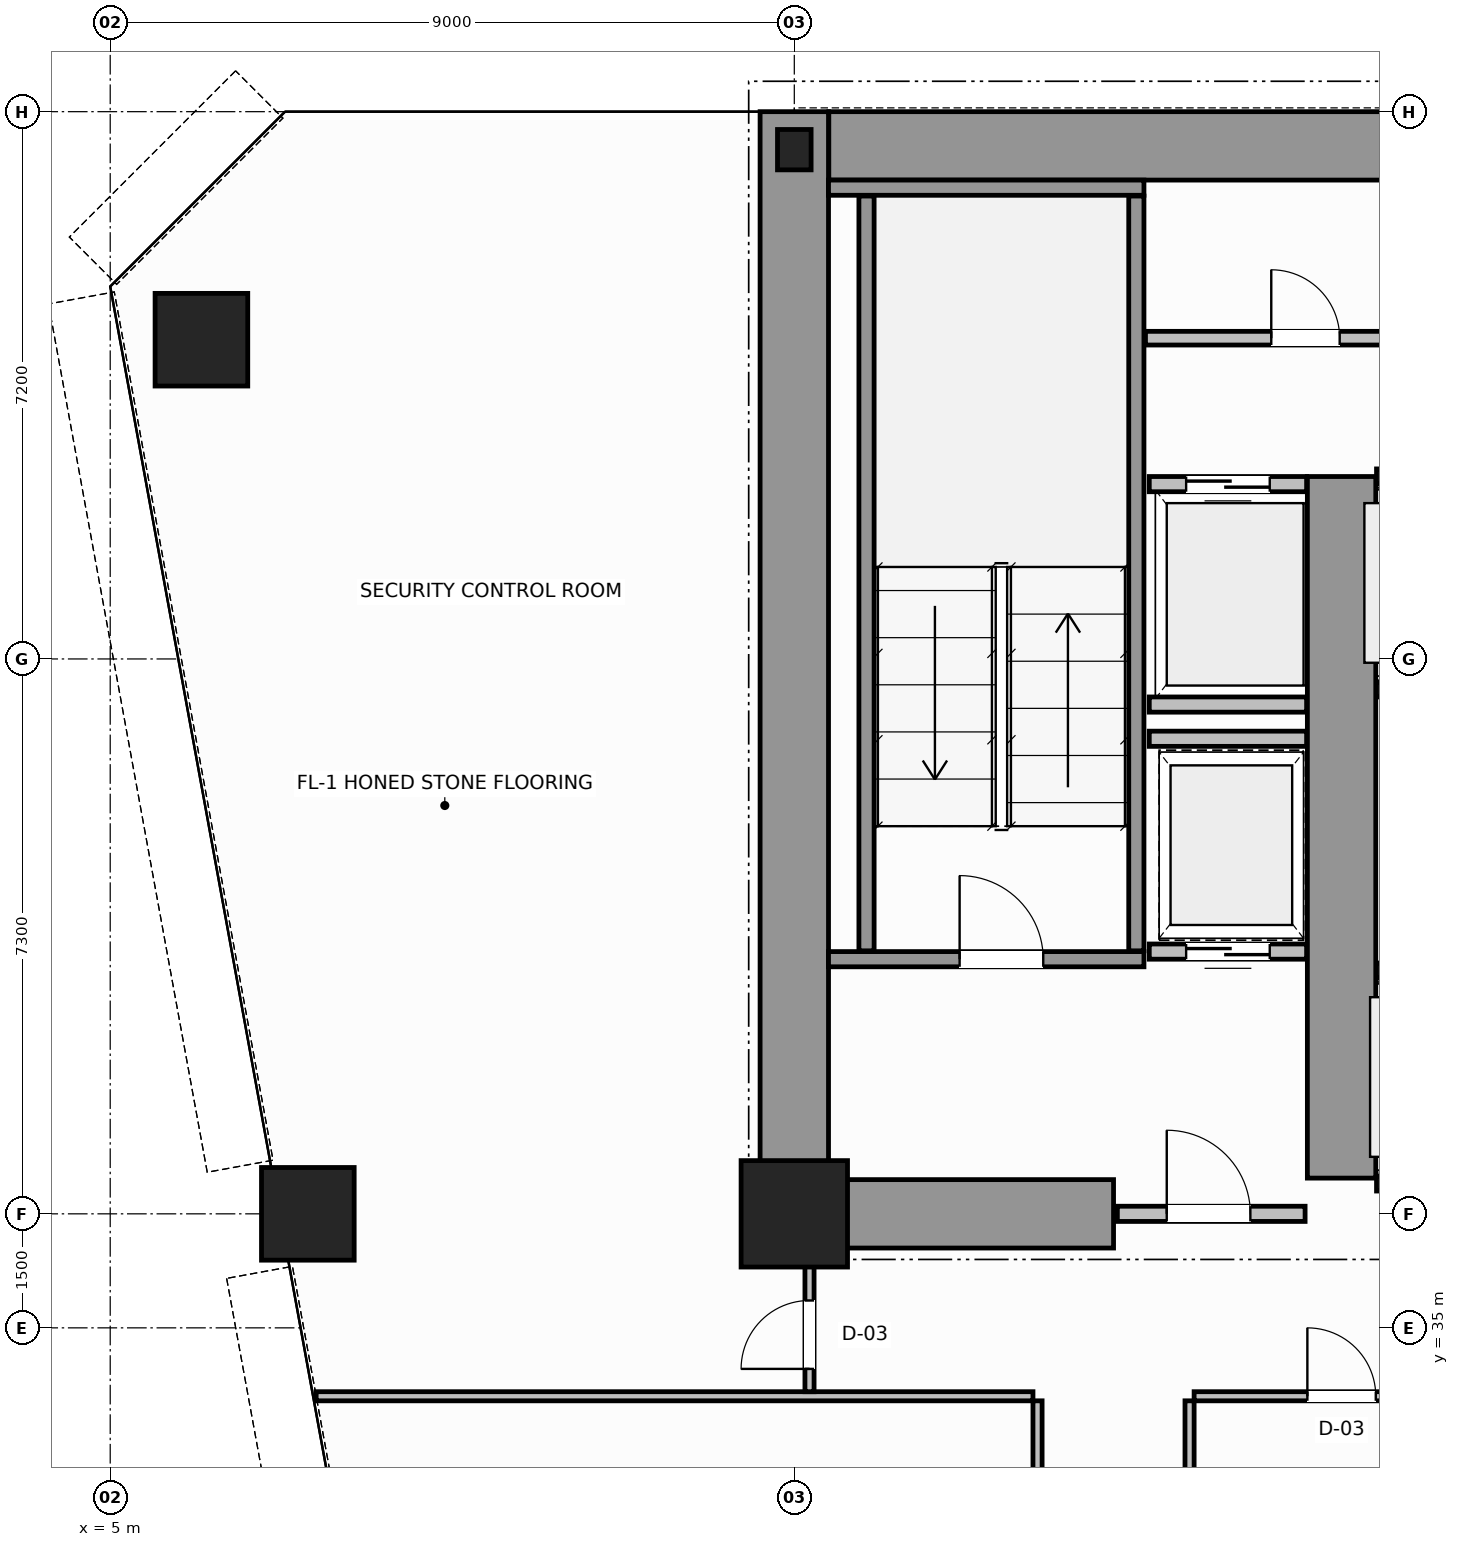
"""IFC4 building model, lengths in metres.
Left out: names, types, materials, properties, quantities, classifications, styles, units other than length and angle.
Written with IfcOpenShell. Run it as: python <this file> out.ifc"""

import sys

from ifc_helpers import new_model, si_unit, direction, frame, frame_2d, origin, origin_2d, place, context, subcontext, project, spatial, rectangle, hollow_circle, i_section, extrude, source, transform, mapped, element, fill, save


model = new_model("IFC4")
c1 = context("Model", 3, precision=1e-05, world=origin(), true_north=direction((0.0, 1.0)))
c2 = subcontext(c1, "Body", "Model", "MODEL_VIEW")
j1 = project(units=[si_unit("LENGTHUNIT", "METRE"), si_unit("PLANEANGLEUNIT", "RADIAN")], contexts=[c1])
p1 = place(None, origin())
s1 = spatial("IfcSite", under=j1, at=p1, CompositionType="ELEMENT")
p2 = place(p1, origin())
s2 = spatial("IfcBuilding", under=s1, at=p2, CompositionType="ELEMENT")
p3 = place(p2, frame((0.0, 0.0, 79.6)))
s3 = spatial("IfcBuildingStorey", under=s2, at=p3, CompositionType="ELEMENT", Elevation=79.6)
m1 = source(origin(), c2, "Body", "SweptSolid", [
    extrude(rectangle(XDim=1.4, YDim=1.4, at=origin_2d()), origin(), (0.0, 0.0, 1.0), 3.8),
])
p4 = place(p3, frame((14.0, 36.5, 0.0), z_axis=(0.0, 0.0, 1.0), x_axis=(1.0, 0.0, 0.0)))
e1 = element("IfcColumn", 1, at=p4, inside=s3, PredefinedType="COLUMN", context=c2, shape_type="MappedRepresentation", body=[
    mapped(m1, transform((0.0, 0.0, 0.0), scale=1.0)),
])
m2 = source(origin(), c2, "Body", "SweptSolid", [
    extrude(i_section(OverallWidth=0.442, OverallDepth=0.531, WebThickness=0.065, FlangeThickness=0.076, FilletRadius=0.015, at=origin_2d()), origin(), (0.0, 0.0, 1.0), 3.8),
])
p5 = place(p3, frame((14.0, 50.5, 0.0), z_axis=(0.0, 0.0, 1.0), x_axis=(1.0, 0.0, 0.0)))
e2 = element("IfcColumn", 2, at=p5, inside=s3, PredefinedType="COLUMN", context=c2, shape_type="MappedRepresentation", body=[
    mapped(m2, transform((0.0, 0.0, 0.0), scale=1.0)),
])
m3 = source(origin(), c2, "Body", "SweptSolid", [
    extrude(hollow_circle(Radius=0.61, WallThickness=0.05, at=origin_2d()), origin(), (0.0, 0.0, 1.0), 3.8),
])
for number, where, z_axis, x_axis in (
    (3, (6.2, 48.0, 0.0), (0.0, 0.0, 1.0), (1.0, 0.0, 0.0)),
    (4, (7.6, 36.5, 0.0), (0.0, 0.0, 1.0), (1.0, 0.0, 0.0)),
):
    element("IfcColumn", number, at=place(p3, frame(where, z_axis=z_axis, x_axis=x_axis)), inside=s3, PredefinedType="COLUMN", context=c2, shape_type="MappedRepresentation", body=[
        mapped(m3, transform((0.0, 0.0, 0.0), scale=1.0)),
    ])
p6 = place(p3, frame((14.454, 50.55, 0.0), z_axis=(0.0, 0.0, 1.0), x_axis=(1.0, 0.0, 0.0)))
e5 = element("IfcWall", 5, at=p6, inside=s3, PredefinedType="SHEAR", context=c2, shape_type="SweptSolid", body=[
    extrude(rectangle(XDim=19.544, YDim=0.9, at=frame_2d((9.772, 0.0))), origin(), (0.0, 0.0, 1.0), 3.8),
])
p7 = place(p3, frame((14.0, 36.5, 0.0), z_axis=(0.0, 0.0, 1.0), x_axis=(0.0, 1.0, 0.0)))
e6 = element("IfcWall", 6, at=p7, inside=s3, PredefinedType="SHEAR", context=c2, shape_type="SweptSolid", body=[
    extrude(rectangle(XDim=14.5, YDim=0.9, at=frame_2d((7.25, 0.0))), origin(), (0.0, 0.0, 1.0), 3.8),
])
p8 = place(p3, frame((14.47, 36.5, 0.0), z_axis=(0.0, 0.0, 1.0), x_axis=(1.0, 0.0, 0.0)))
e7 = element("IfcWall", 7, at=p8, inside=s3, PredefinedType="SHEAR", context=c2, shape_type="SweptSolid", body=[
    extrude(rectangle(XDim=3.73, YDim=0.9, at=frame_2d((1.865, 0.0))), origin(), (0.0, 0.0, 1.0), 2.34),
])
p9 = place(p3, frame((21.2, 36.97, 0.0), z_axis=(0.0, 0.0, 1.0), x_axis=(0.0, 1.0, 0.0)))
e8 = element("IfcWall", 8, at=p9, inside=s3, PredefinedType="SHEAR", context=c2, shape_type="SweptSolid", body=[
    extrude(rectangle(XDim=9.23, YDim=0.9, at=frame_2d((4.615, 0.0))), origin(), (0.0, 0.0, 1.0), 3.8),
])
p10 = place(p3, frame((14.45, 39.85, 0.0), z_axis=(0.0, 0.0, 1.0), x_axis=(1.0, 0.0, 0.0)))
e9 = element("IfcWall", 9, at=p10, inside=s3, PredefinedType="SOLIDWALL", context=c2, shape_type="SweptSolid", body=[
    extrude(rectangle(XDim=4.15, YDim=0.2, at=frame_2d((2.075, 0.0))), origin(), (0.0, 0.0, 1.0), 3.8),
])
p11 = place(p10, frame((1.725, 0.0, 0.0)))
e10 = element("IfcOpeningElement", 10, at=p11, cuts=e9, PredefinedType="OPENING", context=c2, shape_type="SweptSolid", body=[
    extrude(rectangle(XDim=1.1, YDim=2.15, at=frame_2d((0.55, 1.075))), frame((0.0, 0.11, 0.0), z_axis=(0.0, -1.0, 0.0), x_axis=(1.0, 0.0, 0.0)), (0.0, 0.0, 1.0), 0.22),
])
p12 = place(p3, frame((14.45, 50.0, 0.0), z_axis=(0.0, 0.0, 1.0), x_axis=(1.0, 0.0, 0.0)))
e11 = element("IfcWall", 11, at=p12, inside=s3, PredefinedType="SOLIDWALL", context=c2, shape_type="SweptSolid", body=[
    extrude(rectangle(XDim=4.15, YDim=0.2, at=frame_2d((2.075, 0.0))), origin(), (0.0, 0.0, 1.0), 3.8),
])
for number, where, z_axis, x_axis in (
    (12, (14.95, 39.96, 0.0), (0.0, 0.0, 1.0), (0.0, 1.0, 0.0)),
    (13, (18.5, 39.96, 0.0), (0.0, 0.0, 1.0), (0.0, 1.0, 0.0)),
):
    element("IfcWall", number, at=place(p3, frame(where, z_axis=z_axis, x_axis=x_axis)), inside=s3, PredefinedType="SOLIDWALL", context=c2, shape_type="SweptSolid", body=[
        extrude(rectangle(XDim=9.93, YDim=0.2, at=frame_2d((4.965, 0.0))), origin(), (0.0, 0.0, 1.0), 3.8),
    ])
p13 = place(p3, frame((18.25, 36.5, 0.0), z_axis=(0.0, 0.0, 1.0), x_axis=(1.0, 0.0, 0.0)))
e14 = element("IfcWall", 14, at=p13, inside=s3, PredefinedType="SOLIDWALL", context=c2, shape_type="SweptSolid", body=[
    extrude(rectangle(XDim=2.47, YDim=0.2, at=frame_2d((1.235, 0.0))), origin(), (0.0, 0.0, 1.0), 2.33),
])
p14 = place(p13, frame((0.65, 0.0, 0.0)))
e15 = element("IfcOpeningElement", 15, at=p14, cuts=e14, PredefinedType="OPENING", context=c2, shape_type="SweptSolid", body=[
    extrude(rectangle(XDim=1.1, YDim=2.15, at=frame_2d((0.55, 1.075))), frame((0.0, 0.11, 0.0), z_axis=(0.0, -1.0, 0.0), x_axis=(1.0, 0.0, 0.0)), (0.0, 0.0, 1.0), 0.22),
])
p15 = place(p3, frame((21.66, 39.7, 0.0), z_axis=(0.0, 0.0, 1.0), x_axis=(1.0, 0.0, 0.0)))
e16 = element("IfcWall", 16, at=p15, inside=s3, PredefinedType="SOLIDWALL", context=c2, shape_type="SweptSolid", body=[
    extrude(rectangle(XDim=1.77, YDim=0.2, at=frame_2d((0.885, 0.0))), origin(), (0.0, 0.0, 1.0), 3.54),
])
p16 = place(p15, frame((0.335, 0.0, 0.0)))
e17 = element("IfcOpeningElement", 17, at=p16, cuts=e16, PredefinedType="OPENING", context=c2, shape_type="SweptSolid", body=[
    extrude(rectangle(XDim=1.1, YDim=2.15, at=frame_2d((0.55, 1.075))), frame((0.0, 0.11, 0.0), z_axis=(0.0, -1.0, 0.0), x_axis=(1.0, 0.0, 0.0)), (0.0, 0.0, 1.0), 0.22),
])
p17 = place(p3, frame((21.66, 36.9, 0.0), z_axis=(0.0, 0.0, 1.0), x_axis=(1.0, 0.0, 0.0)))
e18 = element("IfcWall", 18, at=p17, inside=s3, PredefinedType="SOLIDWALL", context=c2, shape_type="SweptSolid", body=[
    extrude(rectangle(XDim=1.77, YDim=0.2, at=frame_2d((0.885, 0.0))), origin(), (0.0, 0.0, 1.0), 2.33),
])
p18 = place(p3, frame((21.66, 43.4, 0.0), z_axis=(0.0, 0.0, 1.0), x_axis=(1.0, 0.0, 0.0)))
e19 = element("IfcWall", 19, at=p18, inside=s3, PredefinedType="SOLIDWALL", context=c2, shape_type="SweptSolid", body=[
    extrude(rectangle(XDim=1.65, YDim=0.2, at=frame_2d((0.825, 0.0))), origin(), (0.0, 0.0, 1.0), 3.54),
])
p19 = place(p18, frame((0.275, 0.0, 0.0)))
e20 = element("IfcOpeningElement", 20, at=p19, cuts=e19, PredefinedType="OPENING", context=c2, shape_type="SweptSolid", body=[
    extrude(rectangle(XDim=1.1, YDim=2.15, at=frame_2d((0.55, 1.075))), frame((0.0, 0.11, 0.0), z_axis=(0.0, -1.0, 0.0), x_axis=(1.0, 0.0, 0.0)), (0.0, 0.0, 1.0), 0.22),
])
p20 = place(p3, frame((21.66, 46.2, 0.0), z_axis=(0.0, 0.0, 1.0), x_axis=(1.0, 0.0, 0.0)))
e21 = element("IfcWall", 21, at=p20, inside=s3, PredefinedType="SOLIDWALL", context=c2, shape_type="SweptSolid", body=[
    extrude(rectangle(XDim=1.65, YDim=0.2, at=frame_2d((0.825, 0.0))), origin(), (0.0, 0.0, 1.0), 3.54),
])
p21 = place(p3, frame((18.67, 46.1, 0.0), z_axis=(0.0, 0.0, 1.0), x_axis=(1.0, 0.0, 0.0)))
e22 = element("IfcWall", 22, at=p21, inside=s3, PredefinedType="SOLIDWALL", context=c2, shape_type="SweptSolid", body=[
    extrude(rectangle(XDim=2.07, YDim=0.2, at=frame_2d((1.035, 0.0))), origin(), (0.0, 0.0, 1.0), 3.54),
])
p22 = place(p21, frame((0.485, 0.0, 0.0)))
e23 = element("IfcOpeningElement", 23, at=p22, cuts=e22, PredefinedType="OPENING", context=c2, shape_type="SweptSolid", body=[
    extrude(rectangle(XDim=1.1, YDim=2.15, at=frame_2d((0.55, 1.075))), frame((0.0, 0.11, 0.0), z_axis=(0.0, -1.0, 0.0), x_axis=(1.0, 0.0, 0.0)), (0.0, 0.0, 1.0), 0.22),
])
p23 = place(p3, frame((18.67, 43.2, 0.0), z_axis=(0.0, 0.0, 1.0), x_axis=(1.0, 0.0, 0.0)))
e24 = element("IfcWall", 24, at=p23, inside=s3, PredefinedType="SOLIDWALL", context=c2, shape_type="SweptSolid", body=[
    extrude(rectangle(XDim=2.07, YDim=0.2, at=frame_2d((1.035, 0.0))), origin(), (0.0, 0.0, 1.0), 3.54),
])
p24 = place(p3, frame((18.67, 39.95, 0.0), z_axis=(0.0, 0.0, 1.0), x_axis=(1.0, 0.0, 0.0)))
e25 = element("IfcWall", 25, at=p24, inside=s3, PredefinedType="SOLIDWALL", context=c2, shape_type="SweptSolid", body=[
    extrude(rectangle(XDim=2.07, YDim=0.2, at=frame_2d((1.035, 0.0))), origin(), (0.0, 0.0, 1.0), 3.54),
])
p25 = place(p24, frame((0.485, 0.0, 0.0)))
e26 = element("IfcOpeningElement", 26, at=p25, cuts=e25, PredefinedType="OPENING", context=c2, shape_type="SweptSolid", body=[
    extrude(rectangle(XDim=1.1, YDim=2.15, at=frame_2d((0.55, 1.075))), frame((0.0, 0.11, 0.0), z_axis=(0.0, -1.0, 0.0), x_axis=(1.0, 0.0, 0.0)), (0.0, 0.0, 1.0), 0.22),
])
p26 = place(p3, frame((18.67, 42.75, 0.0), z_axis=(0.0, 0.0, 1.0), x_axis=(1.0, 0.0, 0.0)))
e27 = element("IfcWall", 27, at=p26, inside=s3, PredefinedType="SOLIDWALL", context=c2, shape_type="SweptSolid", body=[
    extrude(rectangle(XDim=2.07, YDim=0.2, at=frame_2d((1.035, 0.0))), origin(), (0.0, 0.0, 1.0), 3.54),
])
p27 = place(p3, frame((18.62, 48.02, 0.0), z_axis=(0.0, 0.0, 1.0), x_axis=(1.0, 0.0, 0.0)))
e28 = element("IfcWall", 28, at=p27, inside=s3, PredefinedType="PLUMBINGWALL", context=c2, shape_type="SweptSolid", body=[
    extrude(rectangle(XDim=30.76, YDim=0.18, at=frame_2d((15.38, 0.0))), origin(), (0.0, 0.0, 1.0), 3.54),
])
p28 = place(p27, frame((1.655, 0.0, 0.0)))
e29 = element("IfcOpeningElement", 29, at=p28, cuts=e28, PredefinedType="OPENING", context=c2, shape_type="SweptSolid", body=[
    extrude(rectangle(XDim=0.9, YDim=2.15, at=frame_2d((0.45, 1.075))), frame((0.0, 0.1, 0.0), z_axis=(0.0, -1.0, 0.0), x_axis=(1.0, 0.0, 0.0)), (0.0, 0.0, 1.0), 0.2),
])
p29 = place(p27, frame((6.03, 0.0, 0.0)))
e30 = element("IfcOpeningElement", 30, at=p29, cuts=e28, PredefinedType="OPENING", context=c2, shape_type="SweptSolid", body=[
    extrude(rectangle(XDim=0.9, YDim=2.15, at=frame_2d((0.45, 1.075))), frame((0.0, 0.1, 0.0), z_axis=(0.0, -1.0, 0.0), x_axis=(1.0, 0.0, 0.0)), (0.0, 0.0, 1.0), 0.2),
])
p30 = place(p27, frame((10.93, 0.0, 0.0)))
e31 = element("IfcOpeningElement", 31, at=p30, cuts=e28, PredefinedType="OPENING", context=c2, shape_type="SweptSolid", body=[
    extrude(rectangle(XDim=0.9, YDim=2.15, at=frame_2d((0.45, 1.075))), frame((0.0, 0.1, 0.0), z_axis=(0.0, -1.0, 0.0), x_axis=(1.0, 0.0, 0.0)), (0.0, 0.0, 1.0), 0.2),
])
p31 = place(p27, frame((16.13, 0.0, 0.0)))
e32 = element("IfcOpeningElement", 32, at=p31, cuts=e28, PredefinedType="OPENING", context=c2, shape_type="SweptSolid", body=[
    extrude(rectangle(XDim=0.9, YDim=2.15, at=frame_2d((0.45, 1.075))), frame((0.0, 0.1, 0.0), z_axis=(0.0, -1.0, 0.0), x_axis=(1.0, 0.0, 0.0)), (0.0, 0.0, 1.0), 0.2),
])
p32 = place(p27, frame((21.73, 0.0, 0.0)))
e33 = element("IfcOpeningElement", 33, at=p32, cuts=e28, PredefinedType="OPENING", context=c2, shape_type="SweptSolid", body=[
    extrude(rectangle(XDim=0.9, YDim=2.15, at=frame_2d((0.45, 1.075))), frame((0.0, 0.1, 0.0), z_axis=(0.0, -1.0, 0.0), x_axis=(1.0, 0.0, 0.0)), (0.0, 0.0, 1.0), 0.2),
])
p33 = place(p27, frame((27.505, 0.0, 0.0)))
e34 = element("IfcOpeningElement", 34, at=p33, cuts=e28, PredefinedType="OPENING", context=c2, shape_type="SweptSolid", body=[
    extrude(rectangle(XDim=0.9, YDim=2.15, at=frame_2d((0.45, 1.075))), frame((0.0, 0.1, 0.0), z_axis=(0.0, -1.0, 0.0), x_axis=(1.0, 0.0, 0.0)), (0.0, 0.0, 1.0), 0.2),
])
p34 = place(p3, frame((19.26, 34.1, 0.0), z_axis=(0.0, 0.0, 1.0), x_axis=(1.0, 0.0, 0.0)))
e35 = element("IfcWall", 35, at=p34, inside=s3, PredefinedType="PARTITIONING", context=c2, shape_type="SweptSolid", body=[
    extrude(rectangle(XDim=29.48, YDim=0.12, at=frame_2d((14.74, 0.0))), origin(), (0.0, 0.0, 1.0), 3.54),
])
p35 = place(p34, frame((1.49, 0.0, 0.0)))
e36 = element("IfcOpeningElement", 36, at=p35, cuts=e35, PredefinedType="OPENING", context=c2, shape_type="SweptSolid", body=[
    extrude(rectangle(XDim=0.9, YDim=2.15, at=frame_2d((0.45, 1.075))), frame((0.0, 0.07, 0.0), z_axis=(0.0, -1.0, 0.0), x_axis=(1.0, 0.0, 0.0)), (0.0, 0.0, 1.0), 0.14),
])
p36 = place(p34, frame((9.79, 0.0, 0.0)))
e37 = element("IfcOpeningElement", 37, at=p36, cuts=e35, PredefinedType="OPENING", context=c2, shape_type="SweptSolid", body=[
    extrude(rectangle(XDim=0.9, YDim=2.15, at=frame_2d((0.45, 1.075))), frame((0.0, 0.07, 0.0), z_axis=(0.0, -1.0, 0.0), x_axis=(1.0, 0.0, 0.0)), (0.0, 0.0, 1.0), 0.14),
])
p37 = place(p34, frame((22.59, 0.0, 0.0)))
e38 = element("IfcOpeningElement", 38, at=p37, cuts=e35, PredefinedType="OPENING", context=c2, shape_type="SweptSolid", body=[
    extrude(rectangle(XDim=0.9, YDim=2.15, at=frame_2d((0.45, 1.075))), frame((0.0, 0.07, 0.0), z_axis=(0.0, -1.0, 0.0), x_axis=(1.0, 0.0, 0.0)), (0.0, 0.0, 1.0), 0.14),
])
p38 = place(p3, frame((7.709, 34.1, 0.0), z_axis=(0.0, 0.0, 1.0), x_axis=(1.0, 0.0, 0.0)))
e39 = element("IfcWall", 39, at=p38, inside=s3, PredefinedType="PARTITIONING", context=c2, shape_type="SweptSolid", body=[
    extrude(rectangle(XDim=9.431, YDim=0.12, at=frame_2d((4.715, 0.0))), origin(), (0.0, 0.0, 1.0), 3.54),
])
p39 = place(p3, frame((14.2, 34.16, 0.0), z_axis=(0.0, 0.0, 1.0), x_axis=(0.0, 1.0, 0.0)))
e40 = element("IfcWall", 40, at=p39, inside=s3, PredefinedType="PARTITIONING", context=c2, shape_type="SweptSolid", body=[
    extrude(rectangle(XDim=2.28, YDim=0.12, at=frame_2d((1.14, 0.0))), origin(), (0.0, 0.0, 1.0), 3.54),
])
p40 = place(p39, frame((0.3, 0.0, 0.0)))
e41 = element("IfcOpeningElement", 41, at=p40, cuts=e40, PredefinedType="OPENING", context=c2, shape_type="SweptSolid", body=[
    extrude(rectangle(XDim=0.9, YDim=2.15, at=frame_2d((0.45, 1.075))), frame((0.0, 0.07, 0.0), z_axis=(0.0, -1.0, 0.0), x_axis=(1.0, 0.0, 0.0)), (0.0, 0.0, 1.0), 0.14),
])
p41 = place(p3, frame((17.2, 12.8, 0.0), z_axis=(0.0, 0.0, 1.0), x_axis=(0.0, 1.0, 0.0)))
e42 = element("IfcWall", 42, at=p41, inside=s3, PredefinedType="PARTITIONING", context=c2, shape_type="SweptSolid", body=[
    extrude(rectangle(XDim=21.24, YDim=0.12, at=frame_2d((10.62, 0.0))), origin(), (0.0, 0.0, 1.0), 3.54),
])
p42 = place(p41, frame((2.85, 0.0, 0.0)))
e43 = element("IfcOpeningElement", 43, at=p42, cuts=e42, PredefinedType="OPENING", context=c2, shape_type="SweptSolid", body=[
    extrude(rectangle(XDim=0.9, YDim=2.15, at=frame_2d((0.45, 1.075))), frame((0.0, 0.07, 0.0), z_axis=(0.0, -1.0, 0.0), x_axis=(1.0, 0.0, 0.0)), (0.0, 0.0, 1.0), 0.14),
])
p43 = place(p41, frame((10.55, 0.0, 0.0)))
e44 = element("IfcOpeningElement", 44, at=p43, cuts=e42, PredefinedType="OPENING", context=c2, shape_type="SweptSolid", body=[
    extrude(rectangle(XDim=0.9, YDim=2.15, at=frame_2d((0.45, 1.075))), frame((0.0, 0.07, 0.0), z_axis=(0.0, -1.0, 0.0), x_axis=(1.0, 0.0, 0.0)), (0.0, 0.0, 1.0), 0.14),
])
p44 = place(p41, frame((17.87, 0.0, 0.0)))
e45 = element("IfcOpeningElement", 45, at=p44, cuts=e42, PredefinedType="OPENING", context=c2, shape_type="SweptSolid", body=[
    extrude(rectangle(XDim=0.9, YDim=2.15, at=frame_2d((0.45, 1.075))), frame((0.0, 0.07, 0.0), z_axis=(0.0, -1.0, 0.0), x_axis=(1.0, 0.0, 0.0)), (0.0, 0.0, 1.0), 0.14),
])
p45 = place(p3, frame((19.2, 12.8, 0.0), z_axis=(0.0, 0.0, 1.0), x_axis=(0.0, 1.0, 0.0)))
e46 = element("IfcWall", 46, at=p45, inside=s3, PredefinedType="PARTITIONING", context=c2, shape_type="SweptSolid", body=[
    extrude(rectangle(XDim=21.24, YDim=0.12, at=frame_2d((10.62, 0.0))), origin(), (0.0, 0.0, 1.0), 3.54),
])
m4 = source(origin(), c2, "Body", "SweptSolid", [
    extrude(rectangle(XDim=1.1, YDim=2.15, at=frame_2d((0.55, 1.075))), frame((0.0, 0.025, 0.0), z_axis=(0.0, -1.0, 0.0), x_axis=(1.0, 0.0, 0.0)), (0.0, 0.0, 1.0), 0.05),
])
p46 = place(p11, origin())
e47 = element("IfcDoor", 47, at=p46, inside=s3, OperationType="SINGLE_SWING_LEFT", PredefinedType="DOOR", context=c2, shape_type="MappedRepresentation", body=[
    mapped(m4, transform((0.0, 0.0, 0.0), scale=1.0)),
])
fill(e10, e47)
p47 = place(p14, origin())
e48 = element("IfcDoor", 48, at=p47, inside=s3, OperationType="SINGLE_SWING_RIGHT", PredefinedType="DOOR", context=c2, shape_type="MappedRepresentation", body=[
    mapped(m4, transform((0.0, 0.0, 0.0), scale=1.0)),
])
fill(e15, e48)
p48 = place(p22, origin())
e49 = element("IfcDoor", 49, at=p48, inside=s3, OperationType="DOUBLE_DOOR_SLIDING", PredefinedType="DOOR", context=c2, shape_type="MappedRepresentation", body=[
    mapped(m4, transform((0.0, 0.0, 0.0), scale=1.0)),
])
fill(e23, e49)
p49 = place(p25, origin())
e50 = element("IfcDoor", 50, at=p49, inside=s3, OperationType="DOUBLE_DOOR_SLIDING", PredefinedType="DOOR", context=c2, shape_type="MappedRepresentation", body=[
    mapped(m4, transform((0.0, 0.0, 0.0), scale=1.0)),
])
fill(e26, e50)
m5 = source(origin(), c2, "Body", "SweptSolid", [
    extrude(rectangle(XDim=0.9, YDim=2.15, at=frame_2d((0.45, 1.075))), frame((0.0, 0.025, 0.0), z_axis=(0.0, -1.0, 0.0), x_axis=(1.0, 0.0, 0.0)), (0.0, 0.0, 1.0), 0.05),
])
p50 = place(p28, origin())
e51 = element("IfcDoor", 51, at=p50, inside=s3, OperationType="SINGLE_SWING_LEFT", PredefinedType="DOOR", context=c2, shape_type="MappedRepresentation", body=[
    mapped(m5, transform((0.0, 0.0, 0.0), scale=1.0)),
])
fill(e29, e51)
p51 = place(p40, origin())
e52 = element("IfcDoor", 52, at=p51, inside=s3, OperationType="SINGLE_SWING_LEFT", PredefinedType="DOOR", context=c2, shape_type="MappedRepresentation", body=[
    mapped(m5, transform((0.0, 0.0, 0.0), scale=1.0)),
])
fill(e41, e52)
p52 = place(p35, origin())
e53 = element("IfcDoor", 53, at=p52, inside=s3, OperationType="SINGLE_SWING_LEFT", PredefinedType="DOOR", context=c2, shape_type="MappedRepresentation", body=[
    mapped(m5, transform((0.0, 0.0, 0.0), scale=1.0)),
])
fill(e36, e53)
save(model, sys.argv[1])
